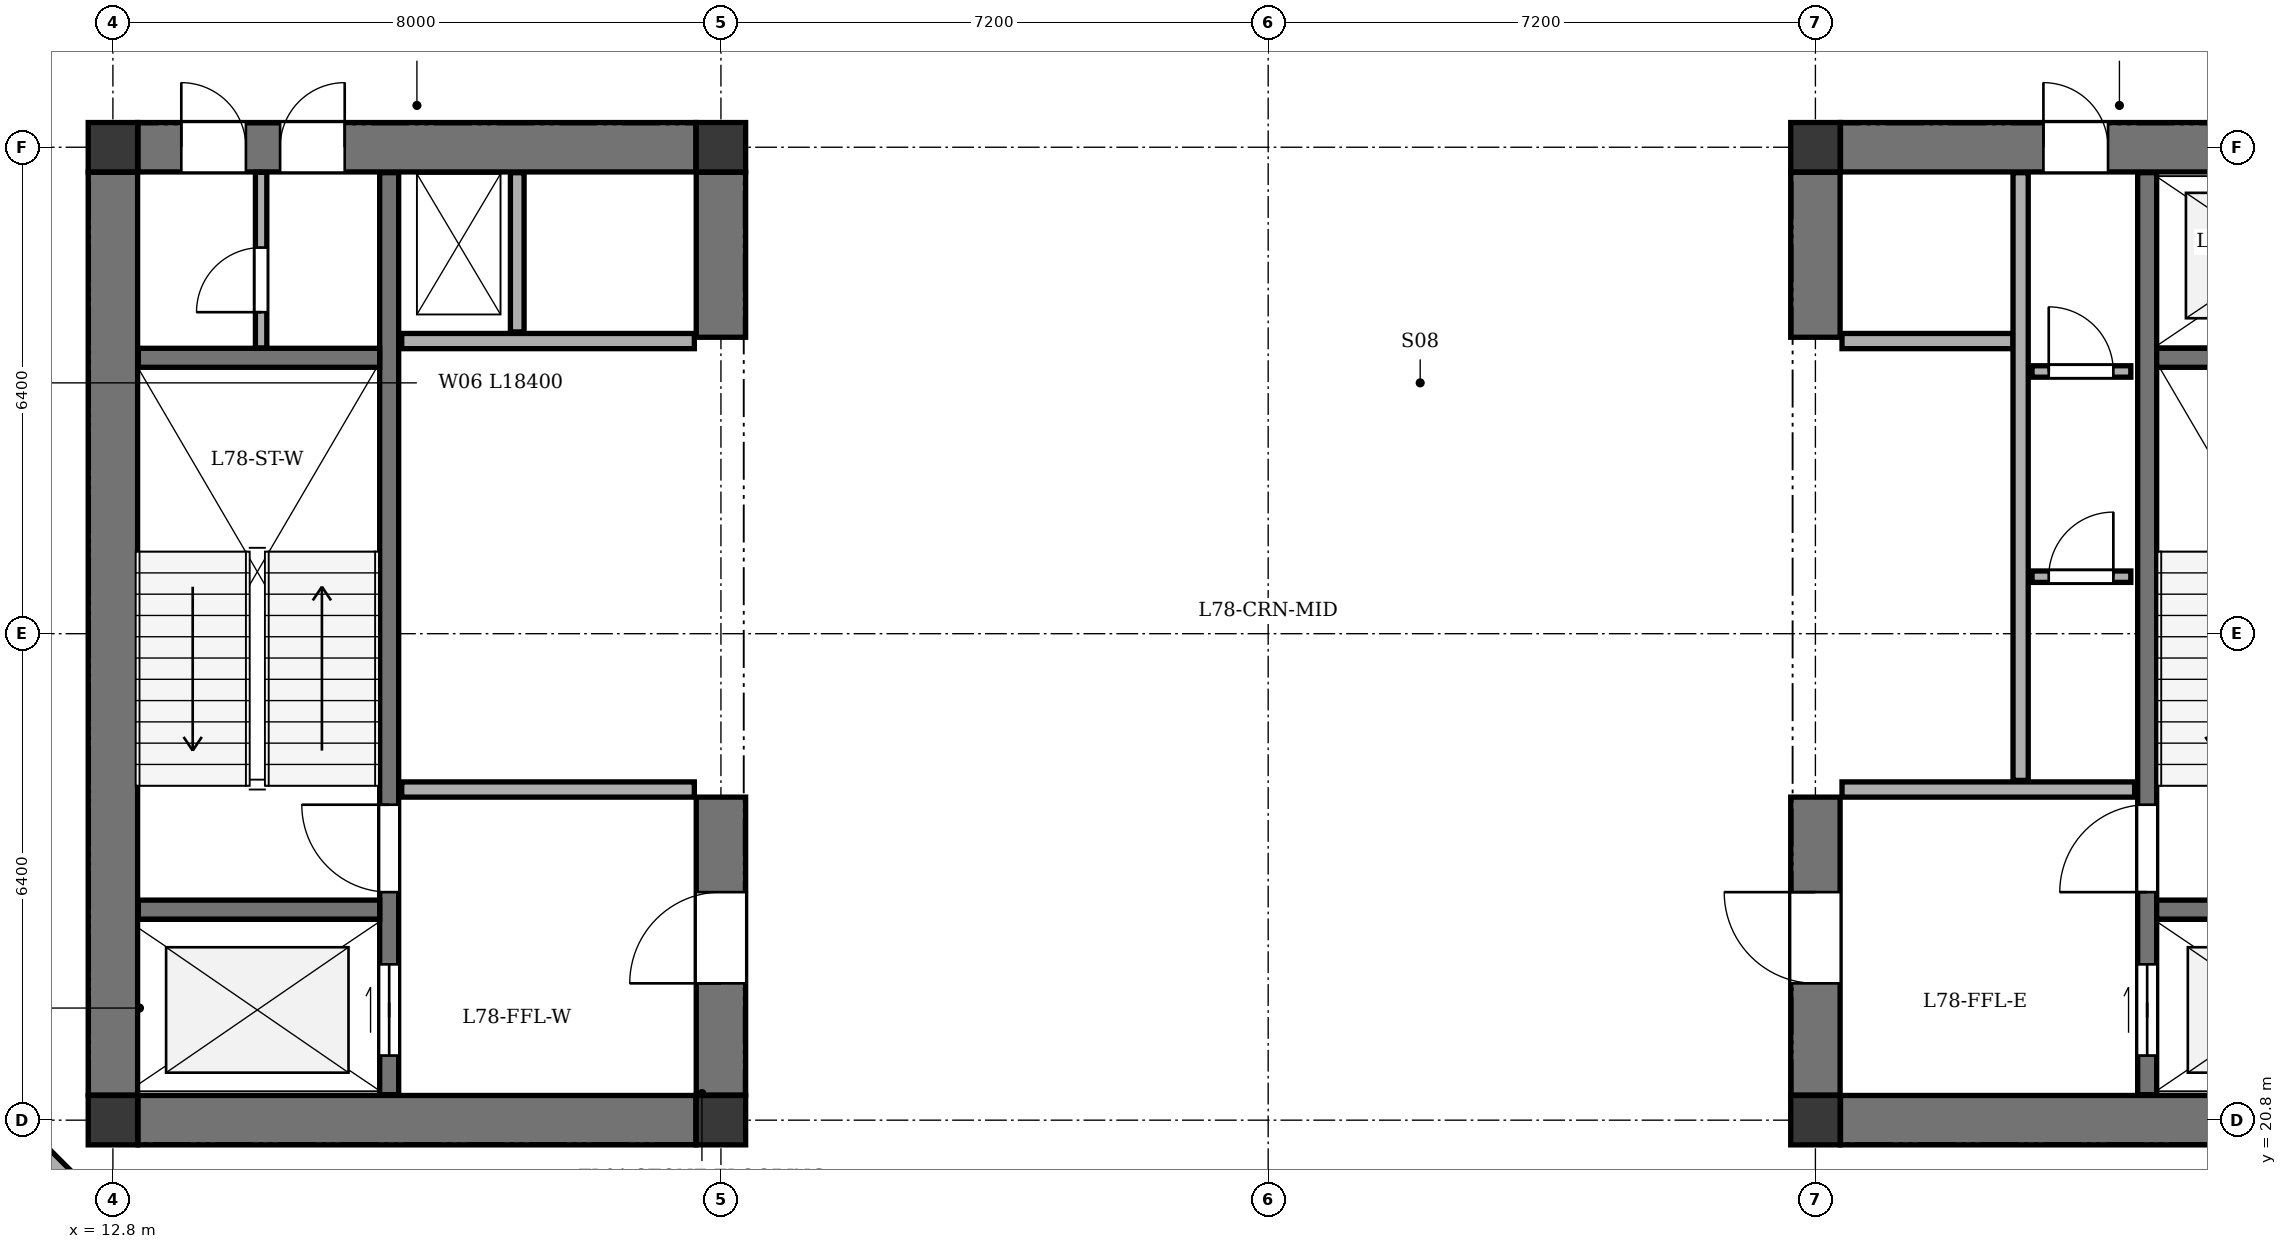
"""IFC4 building model, lengths in metres.
Left out: names, types, materials, properties, quantities, classifications, styles, units other than length and angle.
Written with IfcOpenShell. Run it as: python <this file> out.ifc"""

import sys

from ifc_helpers import new_model, si_unit, direction, frame, frame_2d, origin, origin_2d, place, context, subcontext, project, spatial, rectangle, extrude, element, fill, save


model = new_model("IFC4")
c1 = context("Model", 3, precision=1e-05, world=origin(), true_north=direction((0.0, 1.0)))
c2 = subcontext(c1, "Body", "Model", "MODEL_VIEW")
j1 = project(units=[si_unit("LENGTHUNIT", "METRE"), si_unit("PLANEANGLEUNIT", "RADIAN")], contexts=[c1])
p1 = place(None, origin())
s1 = spatial("IfcSite", under=j1, at=p1, CompositionType="ELEMENT")
p2 = place(p1, origin())
s2 = spatial("IfcBuilding", under=s1, at=p2, CompositionType="ELEMENT")
p3 = place(p2, frame((0.0, 0.0, 296.4)))
s3 = spatial("IfcBuildingStorey", under=s2, at=p3, CompositionType="ELEMENT", Elevation=296.4)
for number, where, z_axis, x_axis in (
    (1, (12.8, 20.8, 0.0), (0.0, 0.0, 1.0), (1.0, 0.0, 0.0)),
    (2, (20.8, 20.8, 0.0), (0.0, 0.0, 1.0), (1.0, 0.0, 0.0)),
    (3, (12.8, 33.6, 0.0), (0.0, 0.0, 1.0), (1.0, 0.0, 0.0)),
    (4, (20.8, 33.6, 0.0), (0.0, 0.0, 1.0), (1.0, 0.0, 0.0)),
    (5, (35.2, 20.8, 0.0), (0.0, 0.0, 1.0), (1.0, 0.0, 0.0)),
    (6, (35.2, 33.6, 0.0), (0.0, 0.0, 1.0), (1.0, 0.0, 0.0)),
):
    element("IfcColumn", number, at=place(p3, frame(where, z_axis=z_axis, x_axis=x_axis)), inside=s3, PredefinedType="COLUMN", context=c2, shape_type="SweptSolid", body=[
        extrude(rectangle(XDim=0.65, YDim=0.65, at=origin_2d()), origin(), (0.0, 0.0, 1.0), 4.2),
    ])
p4 = place(p3, frame((14.2, 17.97, 0.0), z_axis=(0.0, 0.0, 1.0), x_axis=(-0.707080859425, 0.707132701998, 0.0)))
e7 = element("IfcWall", 7, at=p4, inside=s3, PredefinedType="STANDARD", context=c2, shape_type="SweptSolid", body=[
    extrude(rectangle(XDim=4.709, YDim=0.3, at=frame_2d((2.354, 0.0))), origin(), (0.0, 0.0, 1.0), 3.545),
])
p5 = place(p3, frame((12.8, 21.13, 0.0), z_axis=(0.0, 0.0, 1.0), x_axis=(0.0, 1.0, 0.0)))
e8 = element("IfcWall", 8, at=p5, inside=s3, PredefinedType="SHEAR", context=c2, shape_type="SweptSolid", body=[
    extrude(rectangle(XDim=12.14, YDim=0.65, at=frame_2d((6.07, 0.0))), origin(), (0.0, 0.0, 1.0), 3.92),
])
p6 = place(p3, frame((13.13, 20.8, 0.0), z_axis=(0.0, 0.0, 1.0), x_axis=(1.0, 0.0, 0.0)))
e9 = element("IfcWall", 9, at=p6, inside=s3, PredefinedType="SHEAR", context=c2, shape_type="SweptSolid", body=[
    extrude(rectangle(XDim=7.34, YDim=0.65, at=frame_2d((3.67, 0.0))), origin(), (0.0, 0.0, 1.0), 3.92),
])
p7 = place(p3, frame((13.13, 33.6, 0.0), z_axis=(0.0, 0.0, 1.0), x_axis=(1.0, 0.0, 0.0)))
e10 = element("IfcWall", 10, at=p7, inside=s3, PredefinedType="SHEAR", context=c2, shape_type="SweptSolid", body=[
    extrude(rectangle(XDim=7.34, YDim=0.65, at=frame_2d((3.67, 0.0))), origin(), (0.0, 0.0, 1.0), 3.92),
])
p8 = place(p7, frame((0.57, 0.0, 0.0)))
e11 = element("IfcOpeningElement", 11, at=p8, cuts=e10, PredefinedType="OPENING", context=c2, shape_type="SweptSolid", body=[
    extrude(rectangle(XDim=0.85, YDim=2.02, at=frame_2d((0.425, 1.01))), frame((0.0, 0.335, 0.0), z_axis=(0.0, -1.0, 0.0), x_axis=(1.0, 0.0, 0.0)), (0.0, 0.0, 1.0), 0.67),
])
p9 = place(p7, frame((1.87, 0.0, 0.0)))
e12 = element("IfcOpeningElement", 12, at=p9, cuts=e10, PredefinedType="OPENING", context=c2, shape_type="SweptSolid", body=[
    extrude(rectangle(XDim=0.85, YDim=2.02, at=frame_2d((0.425, 1.01))), frame((0.0, 0.335, 0.0), z_axis=(0.0, -1.0, 0.0), x_axis=(1.0, 0.0, 0.0)), (0.0, 0.0, 1.0), 0.67),
])
p10 = place(p3, frame((20.8, 21.13, 0.0), z_axis=(0.0, 0.0, 1.0), x_axis=(0.0, 1.0, 0.0)))
e13 = element("IfcWall", 13, at=p10, inside=s3, PredefinedType="SHEAR", context=c2, shape_type="SweptSolid", body=[
    extrude(rectangle(XDim=3.92, YDim=0.65, at=frame_2d((1.96, 0.0))), origin(), (0.0, 0.0, 1.0), 3.92),
])
p11 = place(p10, frame((1.47, 0.0, 0.0)))
e14 = element("IfcOpeningElement", 14, at=p11, cuts=e13, PredefinedType="OPENING", context=c2, shape_type="SweptSolid", body=[
    extrude(rectangle(XDim=1.2, YDim=2.15, at=frame_2d((0.6, 1.075))), frame((0.0, 0.335, 0.0), z_axis=(0.0, -1.0, 0.0), x_axis=(1.0, 0.0, 0.0)), (0.0, 0.0, 1.0), 0.67),
])
p12 = place(p3, frame((20.8, 31.1, 0.0), z_axis=(0.0, 0.0, 1.0), x_axis=(0.0, 1.0, 0.0)))
e15 = element("IfcWall", 15, at=p12, inside=s3, PredefinedType="SHEAR", context=c2, shape_type="SweptSolid", body=[
    extrude(rectangle(XDim=2.17, YDim=0.65, at=frame_2d((1.085, 0.0))), origin(), (0.0, 0.0, 1.0), 3.92),
])
p13 = place(p3, frame((16.435, 21.135, 0.0), z_axis=(0.0, 0.0, 1.0), x_axis=(0.0, 1.0, 0.0)))
e16 = element("IfcWall", 16, at=p13, inside=s3, PredefinedType="SHEAR", context=c2, shape_type="SweptSolid", body=[
    extrude(rectangle(XDim=12.13, YDim=0.25, at=frame_2d((6.065, 0.0))), origin(), (0.0, 0.0, 1.0), 3.92),
])
p14 = place(p13, frame((0.515, 0.0, 0.0)))
e17 = element("IfcOpeningElement", 17, at=p14, cuts=e16, PredefinedType="OPENING", context=c2, shape_type="SweptSolid", body=[
    extrude(rectangle(XDim=1.2, YDim=2.15, at=frame_2d((0.6, 1.075))), frame((0.0, 0.135, 0.0), z_axis=(0.0, -1.0, 0.0), x_axis=(1.0, 0.0, 0.0)), (0.0, 0.0, 1.0), 0.27),
])
p15 = place(p13, frame((2.665, 0.0, 0.0)))
e18 = element("IfcOpeningElement", 18, at=p15, cuts=e16, PredefinedType="OPENING", context=c2, shape_type="SweptSolid", body=[
    extrude(rectangle(XDim=1.15, YDim=2.15, at=frame_2d((0.575, 1.075))), frame((0.0, 0.135, 0.0), z_axis=(0.0, -1.0, 0.0), x_axis=(1.0, 0.0, 0.0)), (0.0, 0.0, 1.0), 0.27),
])
for number, where, z_axis, x_axis in (
    (19, (13.135, 23.57, 0.0), (0.0, 0.0, 1.0), (1.0, 0.0, 0.0)),
    (20, (13.135, 30.83, 0.0), (0.0, 0.0, 1.0), (1.0, 0.0, 0.0)),
):
    element("IfcWall", number, at=place(p3, frame(where, z_axis=z_axis, x_axis=x_axis)), inside=s3, PredefinedType="SHEAR", context=c2, shape_type="SweptSolid", body=[
        extrude(rectangle(XDim=3.175, YDim=0.25, at=frame_2d((1.587, 0.0))), origin(), (0.0, 0.0, 1.0), 3.92),
    ])
for number, where, z_axis, x_axis in (
    (21, (16.6, 25.15, 0.0), (0.0, 0.0, 1.0), (1.0, 0.0, 0.0)),
    (22, (16.6, 31.05, 0.0), (0.0, 0.0, 1.0), (1.0, 0.0, 0.0)),
):
    element("IfcWall", number, at=place(p3, frame(where, z_axis=z_axis, x_axis=x_axis)), inside=s3, PredefinedType="SOLIDWALL", context=c2, shape_type="SweptSolid", body=[
        extrude(rectangle(XDim=3.85, YDim=0.2, at=frame_2d((1.925, 0.0))), origin(), (0.0, 0.0, 1.0), 3.92),
    ])
p16 = place(p3, frame((18.12, 31.17, 0.0), z_axis=(0.0, 0.0, 1.0), x_axis=(0.0, 1.0, 0.0)))
e23 = element("IfcWall", 23, at=p16, inside=s3, PredefinedType="PARTITIONING", context=c2, shape_type="SweptSolid", body=[
    extrude(rectangle(XDim=2.095, YDim=0.18, at=frame_2d((1.047, 0.0))), origin(), (0.0, 0.0, 1.0), 3.92),
])
p17 = place(p3, frame((35.53, 20.8, 0.0), z_axis=(0.0, 0.0, 1.0), x_axis=(1.0, 0.0, 0.0)))
e24 = element("IfcWall", 24, at=p17, inside=s3, PredefinedType="SHEAR", context=c2, shape_type="SweptSolid", body=[
    extrude(rectangle(XDim=7.34, YDim=0.65, at=frame_2d((3.67, 0.0))), origin(), (0.0, 0.0, 1.0), 3.92),
])
p18 = place(p3, frame((35.53, 33.6, 0.0), z_axis=(0.0, 0.0, 1.0), x_axis=(1.0, 0.0, 0.0)))
e25 = element("IfcWall", 25, at=p18, inside=s3, PredefinedType="SHEAR", context=c2, shape_type="SweptSolid", body=[
    extrude(rectangle(XDim=7.34, YDim=0.65, at=frame_2d((3.67, 0.0))), origin(), (0.0, 0.0, 1.0), 3.92),
])
p19 = place(p18, frame((4.87, 0.0, 0.0)))
e26 = element("IfcOpeningElement", 26, at=p19, cuts=e25, PredefinedType="OPENING", context=c2, shape_type="SweptSolid", body=[
    extrude(rectangle(XDim=1.3, YDim=2.15, at=frame_2d((0.65, 1.075))), frame((0.0, 0.335, 0.0), z_axis=(0.0, -1.0, 0.0), x_axis=(1.0, 0.0, 0.0)), (0.0, 0.0, 1.0), 0.67),
])
p20 = place(p18, frame((2.67, 0.0, 0.0)))
e27 = element("IfcOpeningElement", 27, at=p20, cuts=e25, PredefinedType="OPENING", context=c2, shape_type="SweptSolid", body=[
    extrude(rectangle(XDim=0.85, YDim=2.02, at=frame_2d((0.425, 1.01))), frame((0.0, 0.335, 0.0), z_axis=(0.0, -1.0, 0.0), x_axis=(1.0, 0.0, 0.0)), (0.0, 0.0, 1.0), 0.67),
])
p21 = place(p3, frame((35.2, 21.13, 0.0), z_axis=(0.0, 0.0, 1.0), x_axis=(0.0, 1.0, 0.0)))
e28 = element("IfcWall", 28, at=p21, inside=s3, PredefinedType="SHEAR", context=c2, shape_type="SweptSolid", body=[
    extrude(rectangle(XDim=3.92, YDim=0.65, at=frame_2d((1.96, 0.0))), origin(), (0.0, 0.0, 1.0), 3.92),
])
p22 = place(p21, frame((1.47, 0.0, 0.0)))
e29 = element("IfcOpeningElement", 29, at=p22, cuts=e28, PredefinedType="OPENING", context=c2, shape_type="SweptSolid", body=[
    extrude(rectangle(XDim=1.2, YDim=2.15, at=frame_2d((0.6, 1.075))), frame((0.0, 0.335, 0.0), z_axis=(0.0, -1.0, 0.0), x_axis=(1.0, 0.0, 0.0)), (0.0, 0.0, 1.0), 0.67),
])
p23 = place(p3, frame((35.2, 31.1, 0.0), z_axis=(0.0, 0.0, 1.0), x_axis=(0.0, 1.0, 0.0)))
e30 = element("IfcWall", 30, at=p23, inside=s3, PredefinedType="SHEAR", context=c2, shape_type="SweptSolid", body=[
    extrude(rectangle(XDim=2.17, YDim=0.65, at=frame_2d((1.085, 0.0))), origin(), (0.0, 0.0, 1.0), 3.92),
])
p24 = place(p3, frame((39.565, 21.135, 0.0), z_axis=(0.0, 0.0, 1.0), x_axis=(0.0, 1.0, 0.0)))
e31 = element("IfcWall", 31, at=p24, inside=s3, PredefinedType="SHEAR", context=c2, shape_type="SweptSolid", body=[
    extrude(rectangle(XDim=12.13, YDim=0.25, at=frame_2d((6.065, 0.0))), origin(), (0.0, 0.0, 1.0), 3.92),
])
p25 = place(p24, frame((0.515, 0.0, 0.0)))
e32 = element("IfcOpeningElement", 32, at=p25, cuts=e31, PredefinedType="OPENING", context=c2, shape_type="SweptSolid", body=[
    extrude(rectangle(XDim=1.2, YDim=2.15, at=frame_2d((0.6, 1.075))), frame((0.0, 0.135, 0.0), z_axis=(0.0, -1.0, 0.0), x_axis=(1.0, 0.0, 0.0)), (0.0, 0.0, 1.0), 0.27),
])
p26 = place(p24, frame((2.665, 0.0, 0.0)))
e33 = element("IfcOpeningElement", 33, at=p26, cuts=e31, PredefinedType="OPENING", context=c2, shape_type="SweptSolid", body=[
    extrude(rectangle(XDim=1.15, YDim=2.15, at=frame_2d((0.575, 1.075))), frame((0.0, 0.135, 0.0), z_axis=(0.0, -1.0, 0.0), x_axis=(1.0, 0.0, 0.0)), (0.0, 0.0, 1.0), 0.27),
])
for number, where, z_axis, x_axis in (
    (34, (39.69, 23.57, 0.0), (0.0, 0.0, 1.0), (1.0, 0.0, 0.0)),
    (35, (39.69, 30.83, 0.0), (0.0, 0.0, 1.0), (1.0, 0.0, 0.0)),
):
    element("IfcWall", number, at=place(p3, frame(where, z_axis=z_axis, x_axis=x_axis)), inside=s3, PredefinedType="SHEAR", context=c2, shape_type="SweptSolid", body=[
        extrude(rectangle(XDim=3.175, YDim=0.25, at=frame_2d((1.587, 0.0))), origin(), (0.0, 0.0, 1.0), 3.92),
    ])
p27 = place(p3, frame((35.55, 25.15, 0.0), z_axis=(0.0, 0.0, 1.0), x_axis=(1.0, 0.0, 0.0)))
e36 = element("IfcWall", 36, at=p27, inside=s3, PredefinedType="SOLIDWALL", context=c2, shape_type="SweptSolid", body=[
    extrude(rectangle(XDim=3.85, YDim=0.2, at=frame_2d((1.925, 0.0))), origin(), (0.0, 0.0, 1.0), 3.92),
])
p28 = place(p3, frame((35.55, 31.05, 0.0), z_axis=(0.0, 0.0, 1.0), x_axis=(1.0, 0.0, 0.0)))
e37 = element("IfcWall", 37, at=p28, inside=s3, PredefinedType="SOLIDWALL", context=c2, shape_type="SweptSolid", body=[
    extrude(rectangle(XDim=2.25, YDim=0.2, at=frame_2d((1.125, 0.0))), origin(), (0.0, 0.0, 1.0), 3.92),
])
p29 = place(p3, frame((37.9, 25.27, 0.0), z_axis=(0.0, 0.0, 1.0), x_axis=(0.0, 1.0, 0.0)))
e38 = element("IfcWall", 38, at=p29, inside=s3, PredefinedType="SOLIDWALL", context=c2, shape_type="SweptSolid", body=[
    extrude(rectangle(XDim=7.995, YDim=0.2, at=frame_2d((3.998, 0.0))), origin(), (0.0, 0.0, 1.0), 3.92),
])
p30 = place(p3, frame((14.75, 30.96, 0.0), z_axis=(0.0, 0.0, 1.0), x_axis=(0.0, 1.0, 0.0)))
e39 = element("IfcWall", 39, at=p30, inside=s3, PredefinedType="PARTITIONING", context=c2, shape_type="SweptSolid", body=[
    extrude(rectangle(XDim=2.31, YDim=0.15, at=frame_2d((1.155, 0.0))), origin(), (0.0, 0.0, 1.0), 3.92),
])
p31 = place(p30, frame((0.47, 0.0, 0.0)))
e40 = element("IfcOpeningElement", 40, at=p31, cuts=e39, PredefinedType="OPENING", context=c2, shape_type="SweptSolid", body=[
    extrude(rectangle(XDim=0.85, YDim=2.02, at=frame_2d((0.425, 1.01))), frame((0.0, 0.085, 0.0), z_axis=(0.0, -1.0, 0.0), x_axis=(1.0, 0.0, 0.0)), (0.0, 0.0, 1.0), 0.17),
])
p32 = place(p3, frame((38.05, 27.95, 0.0), z_axis=(0.0, 0.0, 1.0), x_axis=(1.0, 0.0, 0.0)))
e41 = element("IfcWall", 41, at=p32, inside=s3, PredefinedType="PARTITIONING", context=c2, shape_type="SweptSolid", body=[
    extrude(rectangle(XDim=1.3, YDim=0.15, at=frame_2d((0.65, 0.0))), origin(), (0.0, 0.0, 1.0), 3.92),
])
p33 = place(p32, frame((0.22, 0.0, 0.0)))
e42 = element("IfcOpeningElement", 42, at=p33, cuts=e41, PredefinedType="OPENING", context=c2, shape_type="SweptSolid", body=[
    extrude(rectangle(XDim=0.85, YDim=2.02, at=frame_2d((0.425, 1.01))), frame((0.0, 0.085, 0.0), z_axis=(0.0, -1.0, 0.0), x_axis=(1.0, 0.0, 0.0)), (0.0, 0.0, 1.0), 0.17),
])
p34 = place(p3, frame((38.05, 30.65, 0.0), z_axis=(0.0, 0.0, 1.0), x_axis=(1.0, 0.0, 0.0)))
e43 = element("IfcWall", 43, at=p34, inside=s3, PredefinedType="PARTITIONING", context=c2, shape_type="SweptSolid", body=[
    extrude(rectangle(XDim=1.3, YDim=0.15, at=frame_2d((0.65, 0.0))), origin(), (0.0, 0.0, 1.0), 3.92),
])
p35 = place(p34, frame((0.22, 0.0, 0.0)))
e44 = element("IfcOpeningElement", 44, at=p35, cuts=e43, PredefinedType="OPENING", context=c2, shape_type="SweptSolid", body=[
    extrude(rectangle(XDim=0.85, YDim=2.02, at=frame_2d((0.425, 1.01))), frame((0.0, 0.085, 0.0), z_axis=(0.0, -1.0, 0.0), x_axis=(1.0, 0.0, 0.0)), (0.0, 0.0, 1.0), 0.17),
])
p36 = place(p8, origin())
e45 = element("IfcDoor", 45, at=p36, inside=s3, OperationType="SINGLE_SWING_LEFT", PredefinedType="DOOR", context=c2, shape_type="SweptSolid", body=[
    extrude(rectangle(XDim=0.85, YDim=2.02, at=frame_2d((0.425, 1.01))), frame((0.0, 0.025, 0.0), z_axis=(0.0, -1.0, 0.0), x_axis=(1.0, 0.0, 0.0)), (0.0, 0.0, 1.0), 0.05),
])
fill(e11, e45)
p37 = place(p9, origin())
e46 = element("IfcDoor", 46, at=p37, inside=s3, OperationType="SINGLE_SWING_RIGHT", PredefinedType="DOOR", context=c2, shape_type="SweptSolid", body=[
    extrude(rectangle(XDim=0.85, YDim=2.02, at=frame_2d((0.425, 1.01))), frame((0.0, 0.025, 0.0), z_axis=(0.0, -1.0, 0.0), x_axis=(1.0, 0.0, 0.0)), (0.0, 0.0, 1.0), 0.05),
])
fill(e12, e46)
p38 = place(p11, origin())
e47 = element("IfcDoor", 47, at=p38, inside=s3, OperationType="SINGLE_SWING_LEFT", PredefinedType="DOOR", context=c2, shape_type="SweptSolid", body=[
    extrude(rectangle(XDim=1.2, YDim=2.15, at=frame_2d((0.6, 1.075))), frame((0.0, 0.025, 0.0), z_axis=(0.0, -1.0, 0.0), x_axis=(1.0, 0.0, 0.0)), (0.0, 0.0, 1.0), 0.05),
])
fill(e14, e47)
p39 = place(p14, origin())
e48 = element("IfcDoor", 48, at=p39, inside=s3, OperationType="DOUBLE_DOOR_SLIDING", PredefinedType="DOOR", context=c2, shape_type="SweptSolid", body=[
    extrude(rectangle(XDim=1.2, YDim=2.15, at=frame_2d((0.6, 1.075))), frame((0.0, 0.025, 0.0), z_axis=(0.0, -1.0, 0.0), x_axis=(1.0, 0.0, 0.0)), (0.0, 0.0, 1.0), 0.05),
])
fill(e17, e48)
p40 = place(p15, origin())
e49 = element("IfcDoor", 49, at=p40, inside=s3, OperationType="SINGLE_SWING_RIGHT", PredefinedType="DOOR", context=c2, shape_type="SweptSolid", body=[
    extrude(rectangle(XDim=1.15, YDim=2.15, at=frame_2d((0.575, 1.075))), frame((0.0, 0.025, 0.0), z_axis=(0.0, -1.0, 0.0), x_axis=(1.0, 0.0, 0.0)), (0.0, 0.0, 1.0), 0.05),
])
fill(e18, e49)
p41 = place(p20, origin())
e50 = element("IfcDoor", 50, at=p41, inside=s3, OperationType="SINGLE_SWING_LEFT", PredefinedType="DOOR", context=c2, shape_type="SweptSolid", body=[
    extrude(rectangle(XDim=0.85, YDim=2.02, at=frame_2d((0.425, 1.01))), frame((0.0, 0.025, 0.0), z_axis=(0.0, -1.0, 0.0), x_axis=(1.0, 0.0, 0.0)), (0.0, 0.0, 1.0), 0.05),
])
fill(e27, e50)
p42 = place(p22, origin())
e51 = element("IfcDoor", 51, at=p42, inside=s3, OperationType="SINGLE_SWING_RIGHT", PredefinedType="DOOR", context=c2, shape_type="SweptSolid", body=[
    extrude(rectangle(XDim=1.2, YDim=2.15, at=frame_2d((0.6, 1.075))), frame((0.0, 0.025, 0.0), z_axis=(0.0, -1.0, 0.0), x_axis=(1.0, 0.0, 0.0)), (0.0, 0.0, 1.0), 0.05),
])
fill(e29, e51)
p43 = place(p25, origin())
e52 = element("IfcDoor", 52, at=p43, inside=s3, OperationType="DOUBLE_DOOR_SLIDING", PredefinedType="DOOR", context=c2, shape_type="SweptSolid", body=[
    extrude(rectangle(XDim=1.2, YDim=2.15, at=frame_2d((0.6, 1.075))), frame((0.0, 0.025, 0.0), z_axis=(0.0, -1.0, 0.0), x_axis=(1.0, 0.0, 0.0)), (0.0, 0.0, 1.0), 0.05),
])
fill(e32, e52)
p44 = place(p26, origin())
e53 = element("IfcDoor", 53, at=p44, inside=s3, OperationType="SINGLE_SWING_LEFT", PredefinedType="DOOR", context=c2, shape_type="SweptSolid", body=[
    extrude(rectangle(XDim=1.15, YDim=2.15, at=frame_2d((0.575, 1.075))), frame((0.0, 0.025, 0.0), z_axis=(0.0, -1.0, 0.0), x_axis=(1.0, 0.0, 0.0)), (0.0, 0.0, 1.0), 0.05),
])
fill(e33, e53)
p45 = place(p31, origin())
e54 = element("IfcDoor", 54, at=p45, inside=s3, OperationType="SINGLE_SWING_LEFT", PredefinedType="DOOR", context=c2, shape_type="SweptSolid", body=[
    extrude(rectangle(XDim=0.85, YDim=2.02, at=frame_2d((0.425, 1.01))), frame((0.0, 0.025, 0.0), z_axis=(0.0, -1.0, 0.0), x_axis=(1.0, 0.0, 0.0)), (0.0, 0.0, 1.0), 0.05),
])
fill(e40, e54)
p46 = place(p33, origin())
e55 = element("IfcDoor", 55, at=p46, inside=s3, OperationType="SINGLE_SWING_RIGHT", PredefinedType="DOOR", context=c2, shape_type="SweptSolid", body=[
    extrude(rectangle(XDim=0.85, YDim=2.02, at=frame_2d((0.425, 1.01))), frame((0.0, 0.025, 0.0), z_axis=(0.0, -1.0, 0.0), x_axis=(1.0, 0.0, 0.0)), (0.0, 0.0, 1.0), 0.05),
])
fill(e42, e55)
p47 = place(p35, origin())
e56 = element("IfcDoor", 56, at=p47, inside=s3, OperationType="SINGLE_SWING_LEFT", PredefinedType="DOOR", context=c2, shape_type="SweptSolid", body=[
    extrude(rectangle(XDim=0.85, YDim=2.02, at=frame_2d((0.425, 1.01))), frame((0.0, 0.025, 0.0), z_axis=(0.0, -1.0, 0.0), x_axis=(1.0, 0.0, 0.0)), (0.0, 0.0, 1.0), 0.05),
])
fill(e44, e56)
save(model, sys.argv[1])
